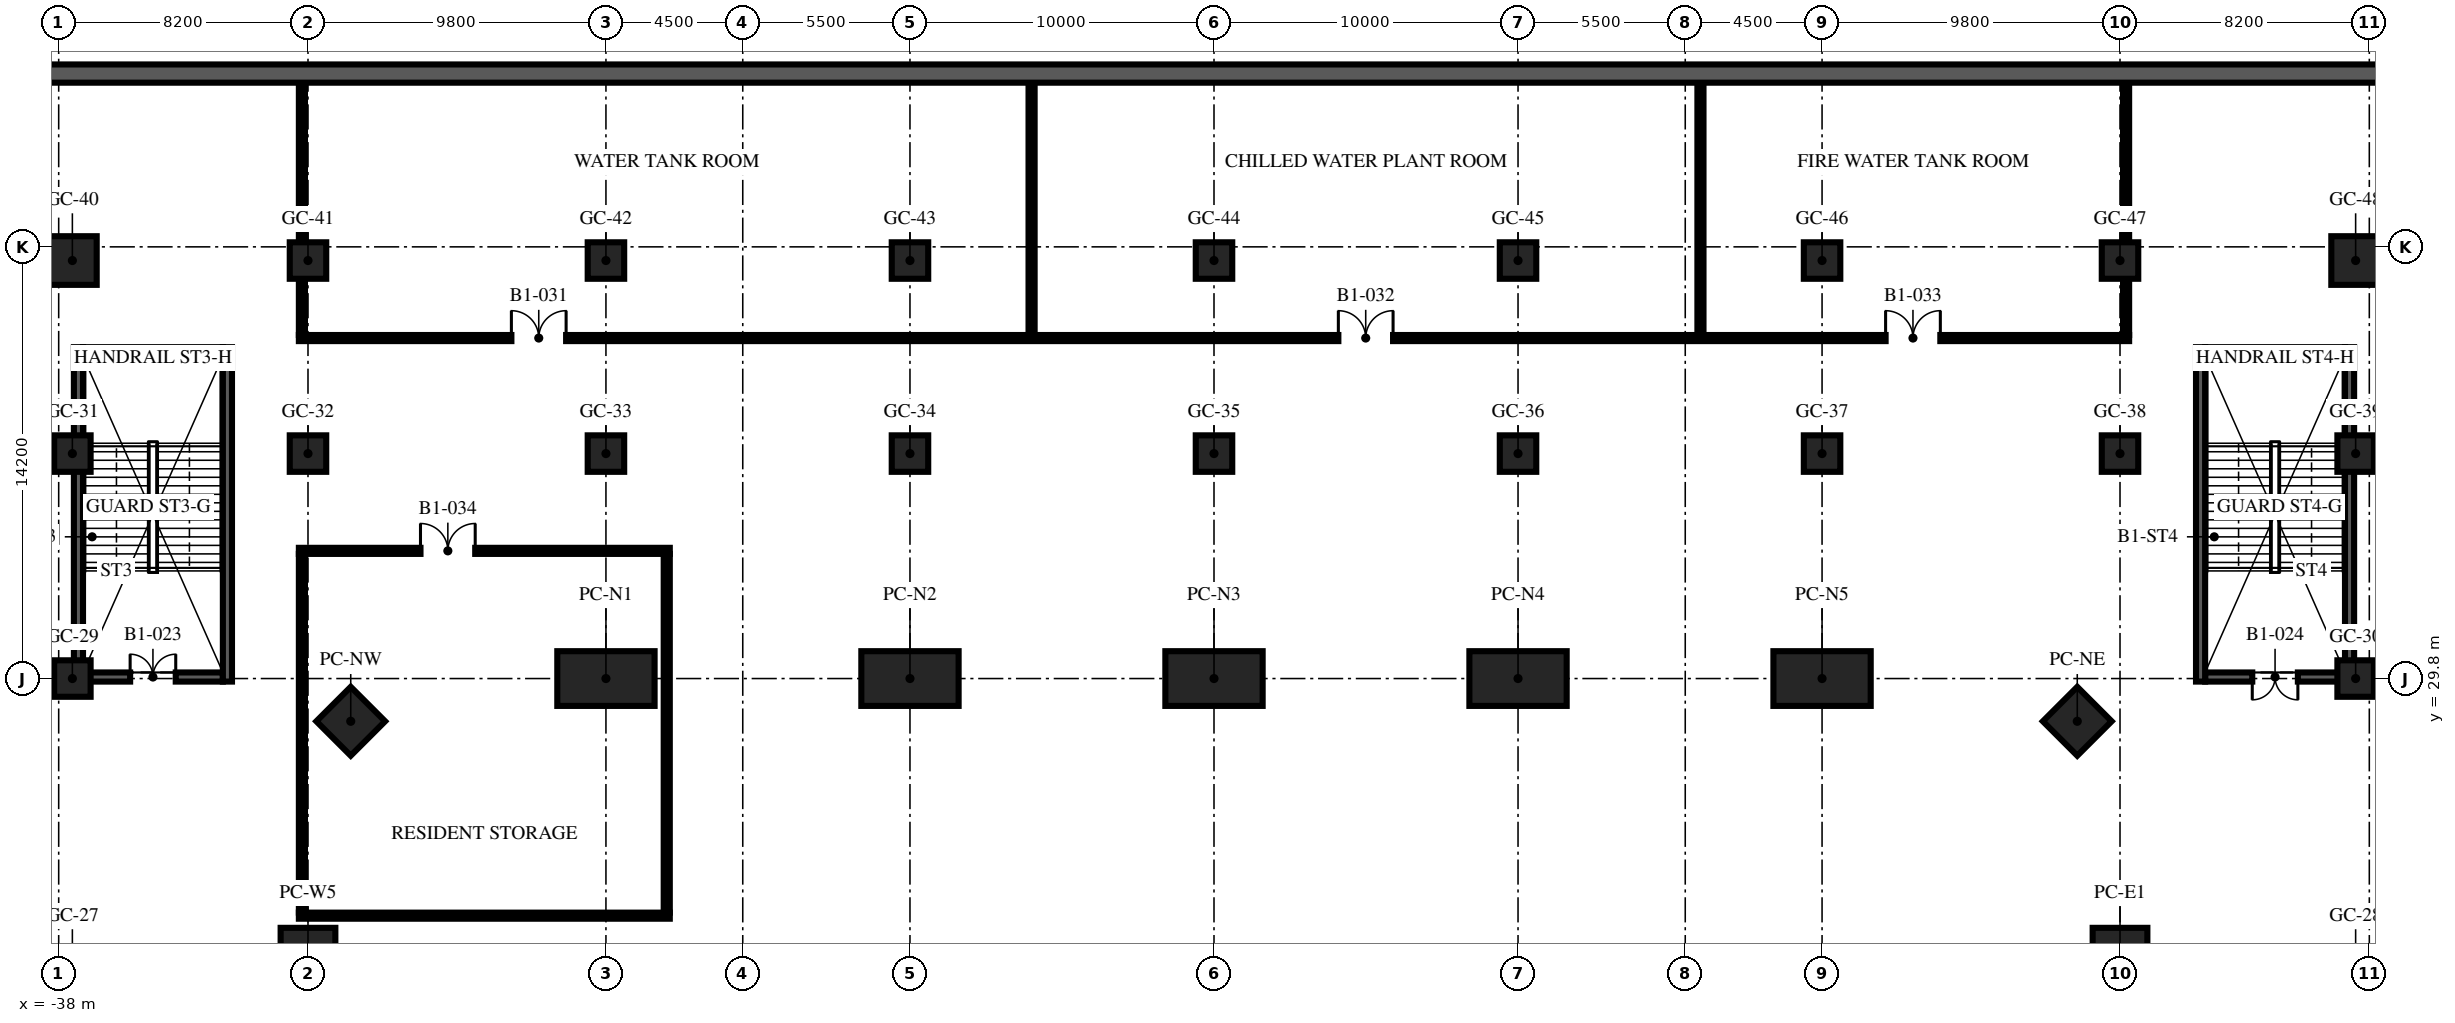
"""IFC4 building model, lengths in metres.
Left out: names, types, materials, properties, quantities, classifications, styles, units other than length and angle.
Written with IfcOpenShell. Run it as: python <this file> out.ifc"""

import sys

from ifc_helpers import new_model, si_unit, direction, frame, frame_2d, origin, origin_2d, place, context, subcontext, project, spatial, rectangle, hollow_rectangle, extrude, element, fill, save


model = new_model("IFC4")
c1 = context("Model", 3, precision=1e-05, world=origin(), true_north=direction((0.0, 1.0)))
c2 = subcontext(c1, "Body", "Model", "MODEL_VIEW")
j1 = project(units=[si_unit("LENGTHUNIT", "METRE"), si_unit("PLANEANGLEUNIT", "RADIAN")], contexts=[c1])
p1 = place(None, origin())
s1 = spatial("IfcSite", under=j1, at=p1, CompositionType="ELEMENT")
p2 = place(p1, origin())
s2 = spatial("IfcBuilding", under=s1, at=p2, CompositionType="ELEMENT")
p3 = place(p2, frame((0.0, 0.0, -5.4)))
s3 = spatial("IfcBuildingStorey", under=s2, at=p3, CompositionType="ELEMENT", Elevation=-5.4)
p4 = place(p3, frame((-46.0, 49.7, -0.3), z_axis=(0.0, 0.0, 1.0), x_axis=(1.0, 0.0, 0.0)))
e1 = element("IfcWall", 1, at=p4, inside=s3, PredefinedType="SOLIDWALL", context=c2, shape_type="SweptSolid", body=[
    extrude(rectangle(XDim=92.0, YDim=0.6, at=frame_2d((46.0, 0.0))), origin(), (0.0, 0.0, 1.0), 5.1),
])
for number, where, z_axis, x_axis in (
    (2, (-20.0, 29.8, 0.0), (0.0, 0.0, 1.0), (1.0, 0.0, 0.0)),
    (3, (-10.0, 29.8, 0.0), (0.0, 0.0, 1.0), (1.0, 0.0, 0.0)),
    (4, (0.0, 29.8, 0.0), (0.0, 0.0, 1.0), (1.0, 0.0, 0.0)),
    (5, (10.0, 29.8, 0.0), (0.0, 0.0, 1.0), (1.0, 0.0, 0.0)),
    (6, (20.0, 29.8, 0.0), (0.0, 0.0, 1.0), (1.0, 0.0, 0.0)),
    (7, (29.8, 20.0, 0.0), (0.0, 0.0, 1.0), (0.0, 1.0, 0.0)),
    (8, (-29.8, 20.0, 0.0), (0.0, 0.0, 1.0), (0.0, 1.0, 0.0)),
):
    element("IfcColumn", number, at=place(p3, frame(where, z_axis=z_axis, x_axis=x_axis)), inside=s3, PredefinedType="COLUMN", context=c2, shape_type="SweptSolid", body=[
        extrude(hollow_rectangle(XDim=3.2, YDim=1.8, WallThickness=0.2, at=origin_2d()), origin(), (0.0, 0.0, 1.0), 5.4),
    ])
for number, where, z_axis, x_axis in (
    (9, (28.394, 28.394, 0.0), (0.0, 0.0, 1.0), (0.707, -0.707, 0.0)),
    (10, (-28.394, 28.394, 0.0), (0.0, 0.0, 1.0), (0.707, 0.707, 0.0)),
):
    element("IfcColumn", number, at=place(p3, frame(where, z_axis=z_axis, x_axis=x_axis)), inside=s3, PredefinedType="COLUMN", context=c2, shape_type="SweptSolid", body=[
        extrude(hollow_rectangle(XDim=1.6, YDim=1.6, WallThickness=0.1, at=origin_2d()), origin(), (0.0, 0.0, 1.0), 5.4),
    ])
for number, where, z_axis, x_axis in (
    (11, (-37.55, 29.8, 0.0), (0.0, 0.0, 1.0), (1.0, 0.0, 0.0)),
    (12, (37.55, 29.8, 0.0), (0.0, 0.0, 1.0), (1.0, 0.0, 0.0)),
    (13, (-37.55, 37.2, 0.0), (0.0, 0.0, 1.0), (1.0, 0.0, 0.0)),
    (14, (-29.8, 37.2, 0.0), (0.0, 0.0, 1.0), (1.0, 0.0, 0.0)),
    (15, (-20.0, 37.2, 0.0), (0.0, 0.0, 1.0), (1.0, 0.0, 0.0)),
    (16, (-10.0, 37.2, 0.0), (0.0, 0.0, 1.0), (1.0, 0.0, 0.0)),
    (17, (0.0, 37.2, 0.0), (0.0, 0.0, 1.0), (1.0, 0.0, 0.0)),
    (18, (10.0, 37.2, 0.0), (0.0, 0.0, 1.0), (1.0, 0.0, 0.0)),
    (19, (20.0, 37.2, 0.0), (0.0, 0.0, 1.0), (1.0, 0.0, 0.0)),
    (20, (29.8, 37.2, 0.0), (0.0, 0.0, 1.0), (1.0, 0.0, 0.0)),
    (21, (37.55, 37.2, 0.0), (0.0, 0.0, 1.0), (1.0, 0.0, 0.0)),
):
    element("IfcColumn", number, at=place(p3, frame(where, z_axis=z_axis, x_axis=x_axis)), inside=s3, PredefinedType="COLUMN", context=c2, shape_type="SweptSolid", body=[
        extrude(rectangle(XDim=1.2, YDim=1.2, at=origin_2d()), origin(), (0.0, 0.0, 1.0), 5.4),
    ])
p5 = place(p3, frame((-37.55, 43.55, 0.0), z_axis=(0.0, 0.0, 1.0), x_axis=(1.0, 0.0, 0.0)))
e22 = element("IfcColumn", 22, at=p5, inside=s3, PredefinedType="COLUMN", context=c2, shape_type="SweptSolid", body=[
    extrude(rectangle(XDim=1.6, YDim=1.6, at=origin_2d()), origin(), (0.0, 0.0, 1.0), 5.4),
])
for number, where, z_axis, x_axis in (
    (23, (-29.8, 43.55, 0.0), (0.0, 0.0, 1.0), (1.0, 0.0, 0.0)),
    (24, (-20.0, 43.55, 0.0), (0.0, 0.0, 1.0), (1.0, 0.0, 0.0)),
    (25, (-10.0, 43.55, 0.0), (0.0, 0.0, 1.0), (1.0, 0.0, 0.0)),
    (26, (0.0, 43.55, 0.0), (0.0, 0.0, 1.0), (1.0, 0.0, 0.0)),
    (27, (10.0, 43.55, 0.0), (0.0, 0.0, 1.0), (1.0, 0.0, 0.0)),
    (28, (20.0, 43.55, 0.0), (0.0, 0.0, 1.0), (1.0, 0.0, 0.0)),
    (29, (29.8, 43.55, 0.0), (0.0, 0.0, 1.0), (1.0, 0.0, 0.0)),
):
    element("IfcColumn", number, at=place(p3, frame(where, z_axis=z_axis, x_axis=x_axis)), inside=s3, PredefinedType="COLUMN", context=c2, shape_type="SweptSolid", body=[
        extrude(rectangle(XDim=1.2, YDim=1.2, at=origin_2d()), origin(), (0.0, 0.0, 1.0), 5.4),
    ])
p6 = place(p3, frame((37.55, 43.55, 0.0), z_axis=(0.0, 0.0, 1.0), x_axis=(1.0, 0.0, 0.0)))
e30 = element("IfcColumn", 30, at=p6, inside=s3, PredefinedType="COLUMN", context=c2, shape_type="SweptSolid", body=[
    extrude(rectangle(XDim=1.6, YDim=1.6, at=origin_2d()), origin(), (0.0, 0.0, 1.0), 5.4),
])
p7 = place(p3, frame((-37.35, 29.7, 0.0), z_axis=(0.0, 0.0, 1.0), x_axis=(0.0, 1.0, 0.0)))
e31 = element("IfcWall", 31, at=p7, inside=s3, PredefinedType="SOLIDWALL", context=c2, shape_type="SweptSolid", body=[
    extrude(rectangle(XDim=11.0, YDim=0.3, at=frame_2d((5.5, 0.0))), origin(), (0.0, 0.0, 1.0), 5.1),
])
p8 = place(p3, frame((-37.2, 29.85, 0.0), z_axis=(0.0, 0.0, 1.0), x_axis=(1.0, 0.0, 0.0)))
e32 = element("IfcWall", 32, at=p8, inside=s3, PredefinedType="SOLIDWALL", context=c2, shape_type="SweptSolid", body=[
    extrude(rectangle(XDim=4.6, YDim=0.3, at=frame_2d((2.3, 0.0))), origin(), (0.0, 0.0, 1.0), 5.1),
])
p9 = place(p8, frame((1.55, 0.0, 0.0)))
e33 = element("IfcOpeningElement", 33, at=p9, cuts=e32, PredefinedType="OPENING", context=c2, shape_type="SweptSolid", body=[
    extrude(rectangle(XDim=1.5, YDim=2.1, at=frame_2d((0.75, 1.05))), frame((0.0, 0.16, 0.0), z_axis=(0.0, -1.0, 0.0), x_axis=(1.0, 0.0, 0.0)), (0.0, 0.0, 1.0), 0.32),
])
p10 = place(p3, frame((-32.45, 29.7, 0.0), z_axis=(0.0, 0.0, 1.0), x_axis=(0.0, 1.0, 0.0)))
e34 = element("IfcWall", 34, at=p10, inside=s3, PredefinedType="SOLIDWALL", context=c2, shape_type="SweptSolid", body=[
    extrude(rectangle(XDim=11.0, YDim=0.3, at=frame_2d((5.5, 0.0))), origin(), (0.0, 0.0, 1.0), 5.1),
])
p11 = place(p3, frame((-37.2, 40.55, 0.0), z_axis=(0.0, 0.0, 1.0), x_axis=(1.0, 0.0, 0.0)))
e35 = element("IfcWall", 35, at=p11, inside=s3, PredefinedType="SOLIDWALL", context=c2, shape_type="SweptSolid", body=[
    extrude(rectangle(XDim=4.6, YDim=0.3, at=frame_2d((2.3, 0.0))), origin(), (0.0, 0.0, 1.0), 5.1),
])
p12 = place(p3, frame((37.35, 29.7, 0.0), z_axis=(0.0, 0.0, 1.0), x_axis=(0.0, 1.0, 0.0)))
e36 = element("IfcWall", 36, at=p12, inside=s3, PredefinedType="SOLIDWALL", context=c2, shape_type="SweptSolid", body=[
    extrude(rectangle(XDim=11.0, YDim=0.3, at=frame_2d((5.5, 0.0))), origin(), (0.0, 0.0, 1.0), 5.1),
])
p13 = place(p3, frame((37.2, 29.85, 0.0), z_axis=(0.0, 0.0, 1.0), x_axis=(-1.0, 0.0, 0.0)))
e37 = element("IfcWall", 37, at=p13, inside=s3, PredefinedType="SOLIDWALL", context=c2, shape_type="SweptSolid", body=[
    extrude(rectangle(XDim=4.6, YDim=0.3, at=frame_2d((2.3, 0.0))), origin(), (0.0, 0.0, 1.0), 5.1),
])
p14 = place(p13, frame((1.55, 0.0, 0.0)))
e38 = element("IfcOpeningElement", 38, at=p14, cuts=e37, PredefinedType="OPENING", context=c2, shape_type="SweptSolid", body=[
    extrude(rectangle(XDim=1.5, YDim=2.1, at=frame_2d((0.75, 1.05))), frame((0.0, 0.16, 0.0), z_axis=(0.0, -1.0, 0.0), x_axis=(1.0, 0.0, 0.0)), (0.0, 0.0, 1.0), 0.32),
])
p15 = place(p3, frame((32.45, 29.7, 0.0), z_axis=(0.0, 0.0, 1.0), x_axis=(0.0, 1.0, 0.0)))
e39 = element("IfcWall", 39, at=p15, inside=s3, PredefinedType="SOLIDWALL", context=c2, shape_type="SweptSolid", body=[
    extrude(rectangle(XDim=11.0, YDim=0.3, at=frame_2d((5.5, 0.0))), origin(), (0.0, 0.0, 1.0), 5.1),
])
p16 = place(p3, frame((37.2, 40.55, 0.0), z_axis=(0.0, 0.0, 1.0), x_axis=(-1.0, 0.0, 0.0)))
e40 = element("IfcWall", 40, at=p16, inside=s3, PredefinedType="SOLIDWALL", context=c2, shape_type="SweptSolid", body=[
    extrude(rectangle(XDim=4.6, YDim=0.3, at=frame_2d((2.3, 0.0))), origin(), (0.0, 0.0, 1.0), 5.1),
])
p17 = place(p3, frame((-30.1, 22.0, 0.0), z_axis=(0.0, 0.0, 1.0), x_axis=(1.0, 0.0, 0.0)))
e41 = element("IfcWall", 41, at=p17, inside=s3, PredefinedType="SOLIDWALL", context=c2, shape_type="SweptSolid", body=[
    extrude(rectangle(XDim=12.2, YDim=0.2, at=frame_2d((6.1, 0.0))), origin(), (0.0, 0.0, 1.0), 3.9),
])
p18 = place(p3, frame((-30.0, 22.1, 0.0), z_axis=(0.0, 0.0, 1.0), x_axis=(0.0, 1.0, 0.0)))
e42 = element("IfcWall", 42, at=p18, inside=s3, PredefinedType="SOLIDWALL", context=c2, shape_type="SweptSolid", body=[
    extrude(rectangle(XDim=11.8, YDim=0.2, at=frame_2d((5.9, 0.0))), origin(), (0.0, 0.0, 1.0), 4.8),
])
p19 = place(p3, frame((-18.0, 22.1, 0.0), z_axis=(0.0, 0.0, 1.0), x_axis=(0.0, 1.0, 0.0)))
e43 = element("IfcWall", 43, at=p19, inside=s3, PredefinedType="SOLIDWALL", context=c2, shape_type="SweptSolid", body=[
    extrude(rectangle(XDim=11.8, YDim=0.2, at=frame_2d((5.9, 0.0))), origin(), (0.0, 0.0, 1.0), 4.1),
])
p20 = place(p3, frame((-30.1, 34.0, 0.0), z_axis=(0.0, 0.0, 1.0), x_axis=(1.0, 0.0, 0.0)))
e44 = element("IfcWall", 44, at=p20, inside=s3, PredefinedType="SOLIDWALL", context=c2, shape_type="SweptSolid", body=[
    extrude(rectangle(XDim=12.2, YDim=0.2, at=frame_2d((6.1, 0.0))), origin(), (0.0, 0.0, 1.0), 4.1),
])
p21 = place(p20, frame((4.0, 0.0, 0.0)))
e45 = element("IfcOpeningElement", 45, at=p21, cuts=e44, PredefinedType="OPENING", context=c2, shape_type="SweptSolid", body=[
    extrude(rectangle(XDim=1.8, YDim=2.4, at=frame_2d((0.9, 1.2))), frame((0.0, 0.11, 0.0), z_axis=(0.0, -1.0, 0.0), x_axis=(1.0, 0.0, 0.0)), (0.0, 0.0, 1.0), 0.22),
])
p22 = place(p3, frame((-30.1, 41.0, 0.0), z_axis=(0.0, 0.0, 1.0), x_axis=(1.0, 0.0, 0.0)))
e46 = element("IfcWall", 46, at=p22, inside=s3, PredefinedType="SOLIDWALL", context=c2, shape_type="SweptSolid", body=[
    extrude(rectangle(XDim=60.2, YDim=0.2, at=frame_2d((30.1, 0.0))), origin(), (0.0, 0.0, 1.0), 4.1),
])
p23 = place(p22, frame((6.99, 0.0, 0.0)))
e47 = element("IfcOpeningElement", 47, at=p23, cuts=e46, PredefinedType="OPENING", context=c2, shape_type="SweptSolid", body=[
    extrude(rectangle(XDim=1.8, YDim=2.4, at=frame_2d((0.9, 1.2))), frame((0.0, 0.11, 0.0), z_axis=(0.0, -1.0, 0.0), x_axis=(1.0, 0.0, 0.0)), (0.0, 0.0, 1.0), 0.22),
])
p24 = place(p22, frame((34.19, 0.0, 0.0)))
e48 = element("IfcOpeningElement", 48, at=p24, cuts=e46, PredefinedType="OPENING", context=c2, shape_type="SweptSolid", body=[
    extrude(rectangle(XDim=1.8, YDim=2.4, at=frame_2d((0.9, 1.2))), frame((0.0, 0.11, 0.0), z_axis=(0.0, -1.0, 0.0), x_axis=(1.0, 0.0, 0.0)), (0.0, 0.0, 1.0), 0.22),
])
p25 = place(p22, frame((52.19, 0.0, 0.0)))
e49 = element("IfcOpeningElement", 49, at=p25, cuts=e46, PredefinedType="OPENING", context=c2, shape_type="SweptSolid", body=[
    extrude(rectangle(XDim=1.8, YDim=2.4, at=frame_2d((0.9, 1.2))), frame((0.0, 0.11, 0.0), z_axis=(0.0, -1.0, 0.0), x_axis=(1.0, 0.0, 0.0)), (0.0, 0.0, 1.0), 0.22),
])
p26 = place(p3, frame((-30.0, 41.1, 0.0), z_axis=(0.0, 0.0, 1.0), x_axis=(0.0, 1.0, 0.0)))
e50 = element("IfcWall", 50, at=p26, inside=s3, PredefinedType="SOLIDWALL", context=c2, shape_type="SweptSolid", body=[
    extrude(rectangle(XDim=1.82, YDim=0.2, at=frame_2d((0.91, 0.0))), origin(), (0.0, 0.0, 1.0), 4.1),
])
for number, where, z_axis, x_axis in (
    (51, (-6.0, 41.1, 0.0), (0.0, 0.0, 1.0), (0.0, 1.0, 0.0)),
    (52, (16.0, 41.1, 0.0), (0.0, 0.0, 1.0), (0.0, 1.0, 0.0)),
):
    element("IfcWall", number, at=place(p3, frame(where, z_axis=z_axis, x_axis=x_axis)), inside=s3, PredefinedType="SOLIDWALL", context=c2, shape_type="SweptSolid", body=[
        extrude(rectangle(XDim=8.28, YDim=0.2, at=frame_2d((4.14, 0.0))), origin(), (0.0, 0.0, 1.0), 4.1),
    ])
p27 = place(p3, frame((30.0, 41.1, 0.0), z_axis=(0.0, 0.0, 1.0), x_axis=(0.0, 1.0, 0.0)))
e53 = element("IfcWall", 53, at=p27, inside=s3, PredefinedType="SOLIDWALL", context=c2, shape_type="SweptSolid", body=[
    extrude(rectangle(XDim=1.82, YDim=0.2, at=frame_2d((0.91, 0.0))), origin(), (0.0, 0.0, 1.0), 4.1),
])
for number, where, z_axis, x_axis in (
    (54, (-30.0, 44.18, 0.0), (0.0, 0.0, 1.0), (0.0, 1.0, 0.0)),
    (55, (30.0, 44.18, 0.0), (0.0, 0.0, 1.0), (0.0, 1.0, 0.0)),
):
    element("IfcWall", number, at=place(p3, frame(where, z_axis=z_axis, x_axis=x_axis)), inside=s3, PredefinedType="SOLIDWALL", context=c2, shape_type="SweptSolid", body=[
        extrude(rectangle(XDim=5.2, YDim=0.2, at=frame_2d((2.6, 0.0))), origin(), (0.0, 0.0, 1.0), 3.4),
    ])
p28 = place(p9, origin())
e56 = element("IfcDoor", 56, at=p28, inside=s3, OperationType="DOUBLE_DOOR_SINGLE_SWING", PredefinedType="DOOR", context=c2, shape_type="SweptSolid", body=[
    extrude(rectangle(XDim=1.5, YDim=2.1, at=frame_2d((0.75, 1.05))), frame((0.0, 0.025, 0.0), z_axis=(0.0, -1.0, 0.0), x_axis=(1.0, 0.0, 0.0)), (0.0, 0.0, 1.0), 0.05),
])
fill(e33, e56)
p29 = place(p14, origin())
e57 = element("IfcDoor", 57, at=p29, inside=s3, OperationType="DOUBLE_DOOR_SINGLE_SWING", PredefinedType="DOOR", context=c2, shape_type="SweptSolid", body=[
    extrude(rectangle(XDim=1.5, YDim=2.1, at=frame_2d((0.75, 1.05))), frame((0.0, 0.025, 0.0), z_axis=(0.0, -1.0, 0.0), x_axis=(1.0, 0.0, 0.0)), (0.0, 0.0, 1.0), 0.05),
])
fill(e38, e57)
p30 = place(p23, origin())
e58 = element("IfcDoor", 58, at=p30, inside=s3, OperationType="DOUBLE_DOOR_SINGLE_SWING", PredefinedType="DOOR", context=c2, shape_type="SweptSolid", body=[
    extrude(rectangle(XDim=1.8, YDim=2.4, at=frame_2d((0.9, 1.2))), frame((0.0, 0.025, 0.0), z_axis=(0.0, -1.0, 0.0), x_axis=(1.0, 0.0, 0.0)), (0.0, 0.0, 1.0), 0.05),
])
fill(e47, e58)
p31 = place(p24, origin())
e59 = element("IfcDoor", 59, at=p31, inside=s3, OperationType="DOUBLE_DOOR_SINGLE_SWING", PredefinedType="DOOR", context=c2, shape_type="SweptSolid", body=[
    extrude(rectangle(XDim=1.8, YDim=2.4, at=frame_2d((0.9, 1.2))), frame((0.0, 0.025, 0.0), z_axis=(0.0, -1.0, 0.0), x_axis=(1.0, 0.0, 0.0)), (0.0, 0.0, 1.0), 0.05),
])
fill(e48, e59)
p32 = place(p25, origin())
e60 = element("IfcDoor", 60, at=p32, inside=s3, OperationType="DOUBLE_DOOR_SINGLE_SWING", PredefinedType="DOOR", context=c2, shape_type="SweptSolid", body=[
    extrude(rectangle(XDim=1.8, YDim=2.4, at=frame_2d((0.9, 1.2))), frame((0.0, 0.025, 0.0), z_axis=(0.0, -1.0, 0.0), x_axis=(1.0, 0.0, 0.0)), (0.0, 0.0, 1.0), 0.05),
])
fill(e49, e60)
p33 = place(p21, origin())
e61 = element("IfcDoor", 61, at=p33, inside=s3, OperationType="DOUBLE_DOOR_SINGLE_SWING", PredefinedType="DOOR", context=c2, shape_type="SweptSolid", body=[
    extrude(rectangle(XDim=1.8, YDim=2.4, at=frame_2d((0.9, 1.2))), frame((0.0, 0.025, 0.0), z_axis=(0.0, -1.0, 0.0), x_axis=(1.0, 0.0, 0.0)), (0.0, 0.0, 1.0), 0.05),
])
fill(e45, e61)
save(model, sys.argv[1])
